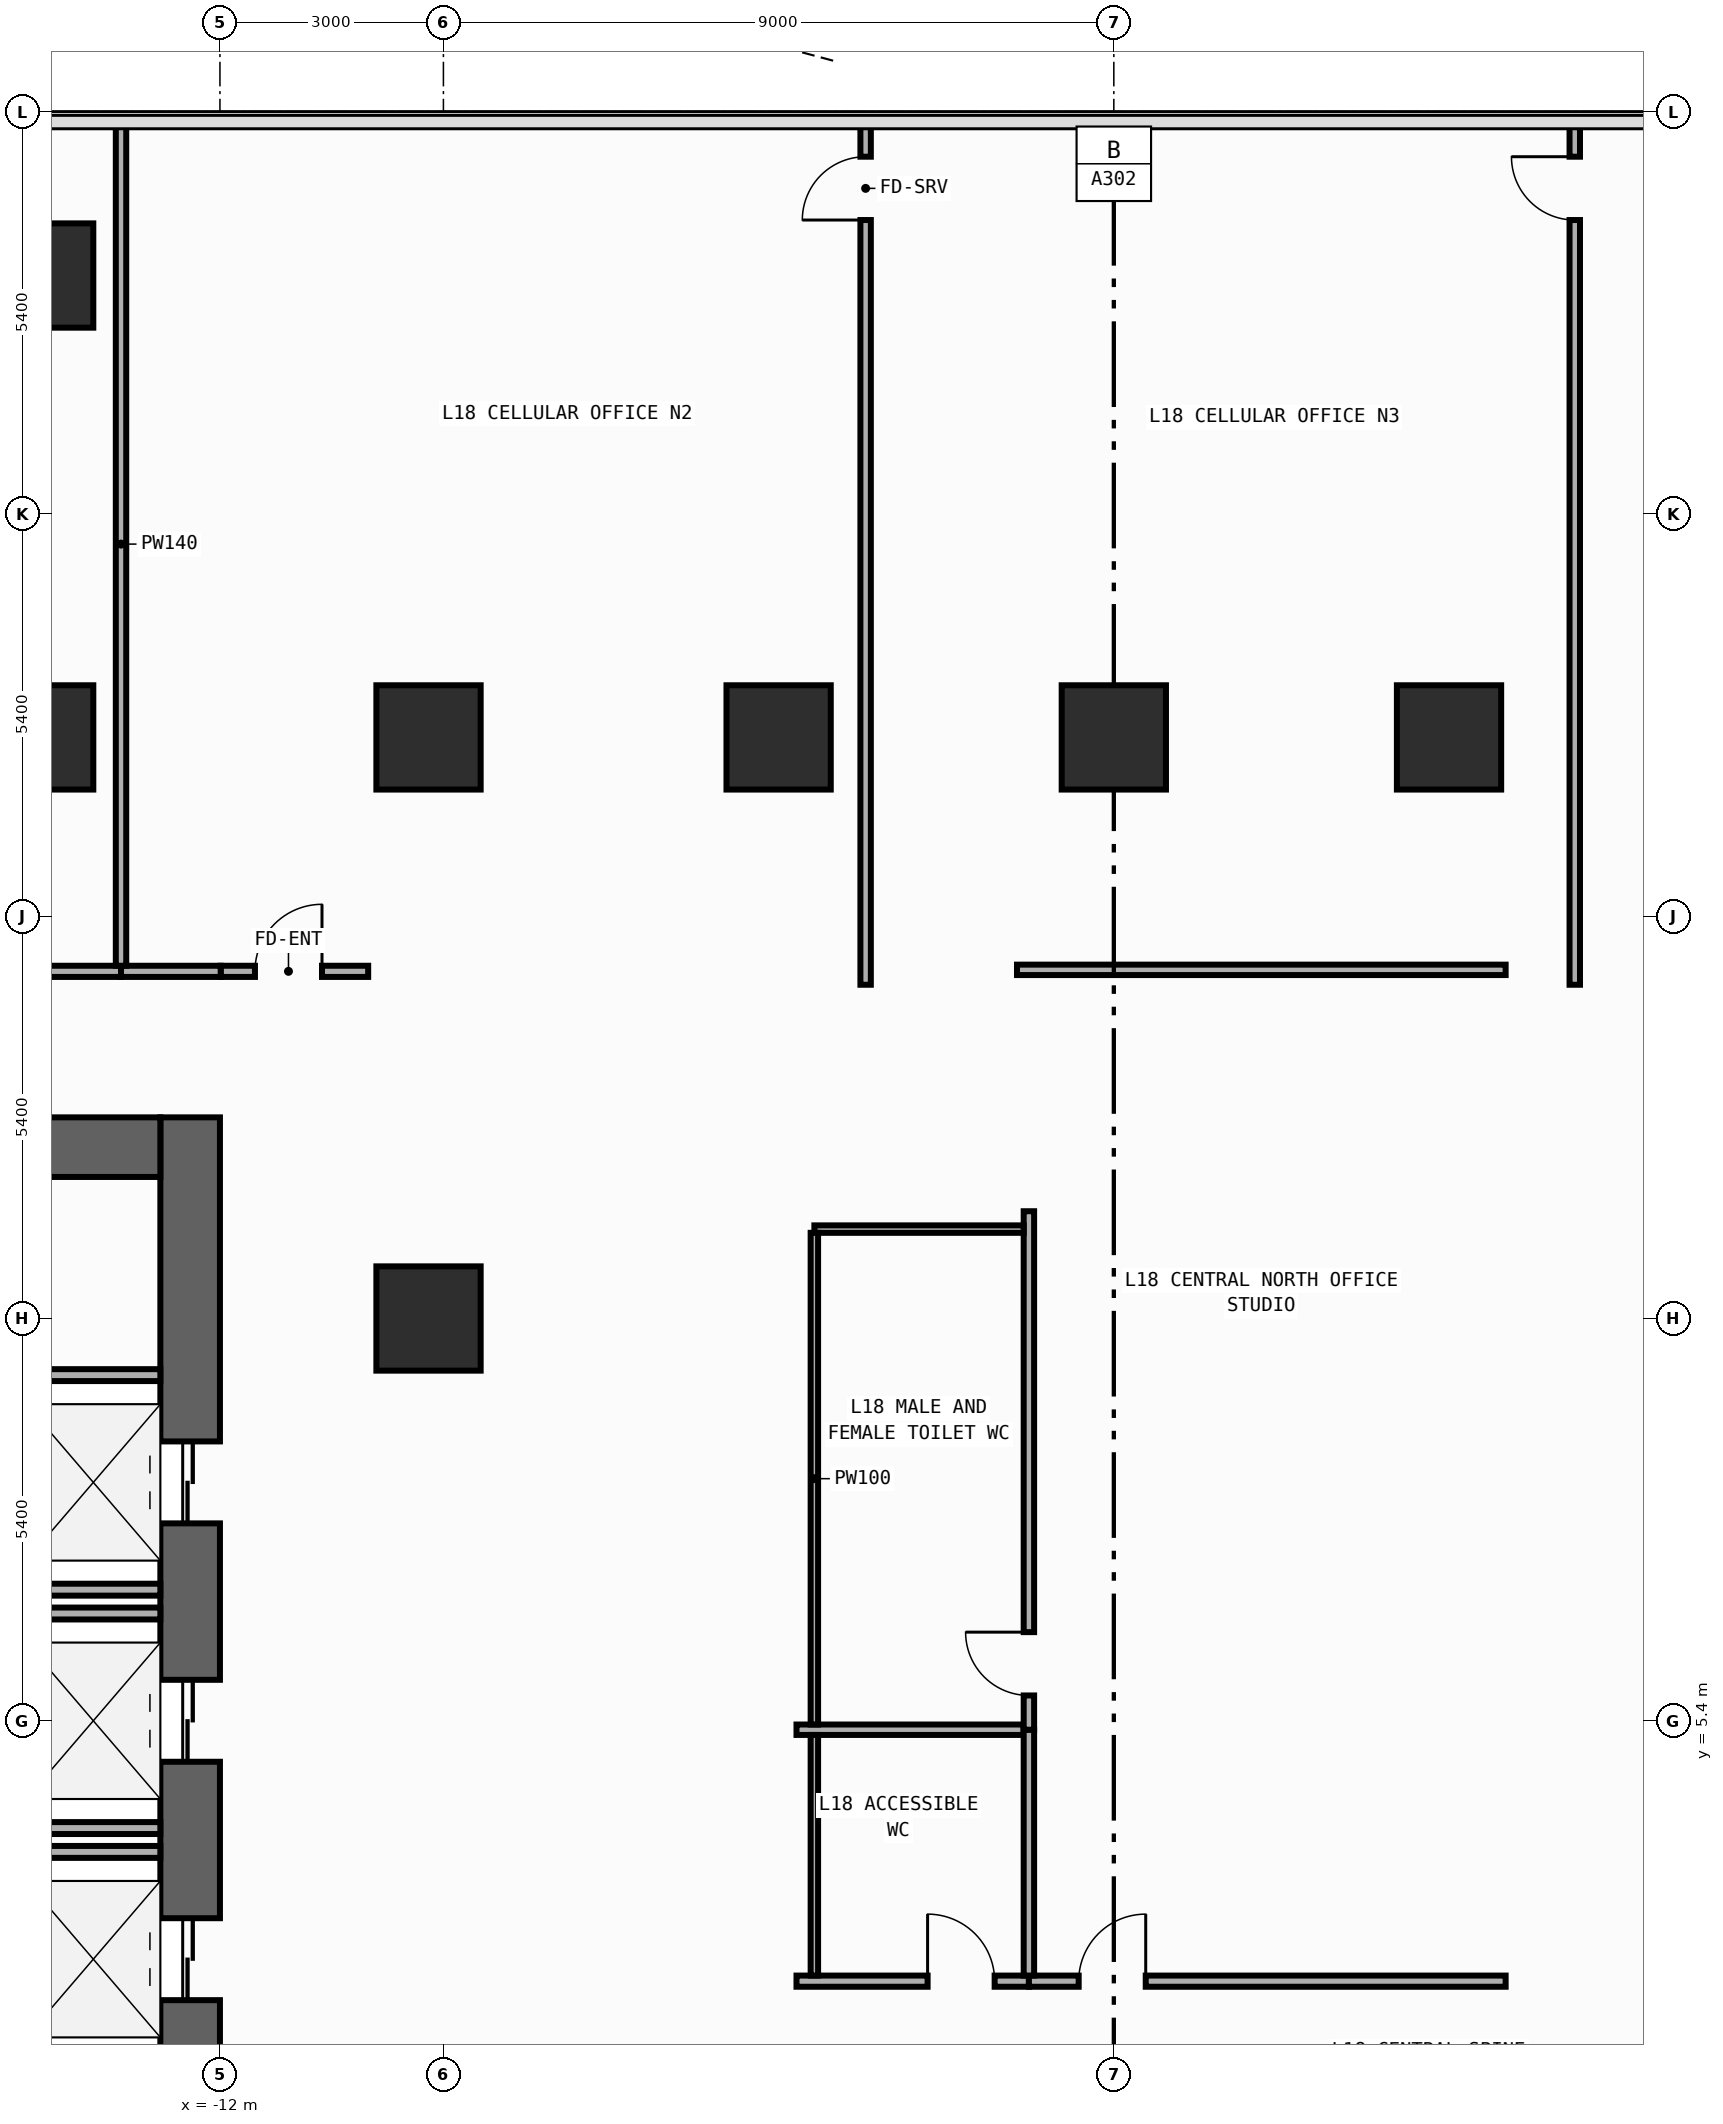
"""IFC4 building model, lengths in metres.
Left out: names, types, materials, properties, quantities, classifications, styles, units other than length and angle.
Written with IfcOpenShell. Run it as: python <this file> out.ifc"""

import sys

from ifc_helpers import new_model, si_unit, direction, frame, frame_2d, origin, origin_2d, place, context, subcontext, project, spatial, rectangle, extrude, element, fill, save


model = new_model("IFC4")
c1 = context("Model", 3, precision=1e-05, world=origin(), true_north=direction((0.0, 1.0)))
c2 = subcontext(c1, "Body", "Model", "MODEL_VIEW")
j1 = project(units=[si_unit("LENGTHUNIT", "METRE"), si_unit("PLANEANGLEUNIT", "RADIAN")], contexts=[c1])
p1 = place(None, origin())
s1 = spatial("IfcSite", under=j1, at=p1, CompositionType="ELEMENT")
p2 = place(p1, origin())
s2 = spatial("IfcBuilding", under=s1, at=p2, CompositionType="ELEMENT")
p3 = place(p2, frame((0.0, 0.0, 76.4)))
s3 = spatial("IfcBuildingStorey", under=s2, at=p3, CompositionType="ELEMENT", Elevation=76.4)
p4 = place(p3, frame((-12.4, -13.5, 0.0), z_axis=(0.0, 0.0, 1.0), x_axis=(0.0, 1.0, 0.0)))
e1 = element("IfcWall", 1, at=p4, inside=s3, PredefinedType="SHEAR", context=c2, shape_type="SweptSolid", body=[
    extrude(rectangle(XDim=27.0, YDim=0.8, at=frame_2d((13.5, 0.0))), origin(), (0.0, 0.0, 1.0), 3.94),
])
p5 = place(p4, frame((21.55, 0.0, 0.0)))
e2 = element("IfcOpeningElement", 2, at=p5, cuts=e1, PredefinedType="OPENING", context=c2, shape_type="SweptSolid", body=[
    extrude(rectangle(XDim=1.1, YDim=2.2, at=frame_2d((0.55, 1.1))), frame((0.0, 0.41, 0.0), z_axis=(0.0, -1.0, 0.0), x_axis=(1.0, 0.0, 0.0)), (0.0, 0.0, 1.0), 0.82),
])
p6 = place(p4, frame((18.35, 0.0, 0.0)))
e3 = element("IfcOpeningElement", 3, at=p6, cuts=e1, PredefinedType="OPENING", context=c2, shape_type="SweptSolid", body=[
    extrude(rectangle(XDim=1.1, YDim=2.2, at=frame_2d((0.55, 1.1))), frame((0.0, 0.41, 0.0), z_axis=(0.0, -1.0, 0.0), x_axis=(1.0, 0.0, 0.0)), (0.0, 0.0, 1.0), 0.82),
])
p7 = place(p4, frame((15.15, 0.0, 0.0)))
e4 = element("IfcOpeningElement", 4, at=p7, cuts=e1, PredefinedType="OPENING", context=c2, shape_type="SweptSolid", body=[
    extrude(rectangle(XDim=1.1, YDim=2.2, at=frame_2d((0.55, 1.1))), frame((0.0, 0.41, 0.0), z_axis=(0.0, -1.0, 0.0), x_axis=(1.0, 0.0, 0.0)), (0.0, 0.0, 1.0), 0.82),
])
p8 = place(p4, frame((10.35, 0.0, 0.0)))
e5 = element("IfcOpeningElement", 5, at=p8, cuts=e1, PredefinedType="OPENING", context=c2, shape_type="SweptSolid", body=[
    extrude(rectangle(XDim=1.1, YDim=2.2, at=frame_2d((0.55, 1.1))), frame((0.0, 0.41, 0.0), z_axis=(0.0, -1.0, 0.0), x_axis=(1.0, 0.0, 0.0)), (0.0, 0.0, 1.0), 0.82),
])
p9 = place(p4, frame((7.15, 0.0, 0.0)))
e6 = element("IfcOpeningElement", 6, at=p9, cuts=e1, PredefinedType="OPENING", context=c2, shape_type="SweptSolid", body=[
    extrude(rectangle(XDim=1.1, YDim=2.2, at=frame_2d((0.55, 1.1))), frame((0.0, 0.41, 0.0), z_axis=(0.0, -1.0, 0.0), x_axis=(1.0, 0.0, 0.0)), (0.0, 0.0, 1.0), 0.82),
])
p10 = place(p4, frame((3.95, 0.0, 0.0)))
e7 = element("IfcOpeningElement", 7, at=p10, cuts=e1, PredefinedType="OPENING", context=c2, shape_type="SweptSolid", body=[
    extrude(rectangle(XDim=1.1, YDim=2.2, at=frame_2d((0.55, 1.1))), frame((0.0, 0.41, 0.0), z_axis=(0.0, -1.0, 0.0), x_axis=(1.0, 0.0, 0.0)), (0.0, 0.0, 1.0), 0.82),
])
p11 = place(p4, frame((12.725, 0.0, 0.0)))
e8 = element("IfcOpeningElement", 8, at=p11, cuts=e1, PredefinedType="OPENING", context=c2, shape_type="SweptSolid", body=[
    extrude(rectangle(XDim=1.15, YDim=2.2, at=frame_2d((0.575, 1.1))), frame((0.0, 0.41, 0.0), z_axis=(0.0, -1.0, 0.0), x_axis=(1.0, 0.0, 0.0)), (0.0, 0.0, 1.0), 0.82),
])
p12 = place(p4, frame((1.625, 0.0, 0.0)))
e9 = element("IfcOpeningElement", 9, at=p12, cuts=e1, PredefinedType="OPENING", context=c2, shape_type="SweptSolid", body=[
    extrude(rectangle(XDim=0.85, YDim=2.1, at=frame_2d((0.425, 1.05))), frame((0.0, 0.41, 0.0), z_axis=(0.0, -1.0, 0.0), x_axis=(1.0, 0.0, 0.0)), (0.0, 0.0, 1.0), 0.82),
])
p13 = place(p3, frame((-19.6, 13.1, 0.0), z_axis=(0.0, 0.0, 1.0), x_axis=(1.0, 0.0, 0.0)))
e10 = element("IfcWall", 10, at=p13, inside=s3, PredefinedType="SHEAR", context=c2, shape_type="SweptSolid", body=[
    extrude(rectangle(XDim=6.8, YDim=0.8, at=frame_2d((3.4, 0.0))), origin(), (0.0, 0.0, 1.0), 3.94),
])
for number, where, z_axis, x_axis in (
    (11, (-9.2, 10.8, 0.0), (0.0, 0.0, 1.0), (1.0, 0.0, 0.0)),
    (12, (-9.2, 18.6, 0.0), (0.0, 0.0, 1.0), (1.0, 0.0, 0.0)),
    (13, (-14.4, 18.6, 0.0), (0.0, 0.0, 1.0), (1.0, 0.0, 0.0)),
    (14, (-4.5, 18.6, 0.0), (0.0, 0.0, 1.0), (1.0, 0.0, 0.0)),
    (15, (0.0, 18.6, 0.0), (0.0, 0.0, 1.0), (1.0, 0.0, 0.0)),
    (16, (4.5, 18.6, 0.0), (0.0, 0.0, 1.0), (1.0, 0.0, 0.0)),
    (17, (-14.4, 24.8, 0.0), (0.0, 0.0, 1.0), (1.0, 0.0, 0.0)),
):
    element("IfcColumn", number, at=place(p3, frame(where, z_axis=z_axis, x_axis=x_axis)), inside=s3, PredefinedType="COLUMN", context=c2, shape_type="SweptSolid", body=[
        extrude(rectangle(XDim=1.4, YDim=1.4, at=origin_2d()), origin(), (0.0, 0.0, 1.0), 4.2),
    ])
for number, where, z_axis, x_axis in (
    (18, (-14.99, 7.16, 0.0), (0.0, 0.0, 1.0), (1.0, 0.0, 0.0)),
    (19, (-14.99, 10.04, 0.0), (0.0, 0.0, 1.0), (1.0, 0.0, 0.0)),
    (20, (-14.99, 3.96, 0.0), (0.0, 0.0, 1.0), (1.0, 0.0, 0.0)),
    (21, (-14.99, 6.84, 0.0), (0.0, 0.0, 1.0), (1.0, 0.0, 0.0)),
    (22, (-14.99, 3.64, 0.0), (0.0, 0.0, 1.0), (1.0, 0.0, 0.0)),
):
    element("IfcWall", number, at=place(p3, frame(where, z_axis=z_axis, x_axis=x_axis)), inside=s3, PredefinedType="STANDARD", context=c2, shape_type="SweptSolid", body=[
        extrude(rectangle(XDim=2.19, YDim=0.16, at=frame_2d((1.095, 0.0))), origin(), (0.0, 0.0, 1.0), 3.94),
    ])
p14 = place(p3, frame((-11.99, 15.46, 0.0), z_axis=(0.0, 0.0, 1.0), x_axis=(1.0, 0.0, 0.0)))
e23 = element("IfcWall", 23, at=p14, inside=s3, PredefinedType="PARTITIONING", context=c2, shape_type="SweptSolid", body=[
    extrude(rectangle(XDim=1.98, YDim=0.15, at=frame_2d((0.99, 0.0))), origin(), (0.0, 0.0, 1.0), 3.94),
])
p15 = place(p14, frame((0.46, 0.0, 0.0)))
e24 = element("IfcOpeningElement", 24, at=p15, cuts=e23, PredefinedType="OPENING", context=c2, shape_type="SweptSolid", body=[
    extrude(rectangle(XDim=0.9, YDim=2.15, at=frame_2d((0.45, 1.075))), frame((0.0, 0.085, 0.0), z_axis=(0.0, -1.0, 0.0), x_axis=(1.0, 0.0, 0.0)), (0.0, 0.0, 1.0), 0.17),
])
p16 = place(p3, frame((-4.26, 1.905, 0.0), z_axis=(0.0, 0.0, 1.0), x_axis=(1.0, 0.0, 0.0)))
e25 = element("IfcWall", 25, at=p16, inside=s3, PredefinedType="PARTITIONING", context=c2, shape_type="SweptSolid", body=[
    extrude(rectangle(XDim=3.12, YDim=0.15, at=frame_2d((1.56, 0.0))), origin(), (0.0, 0.0, 1.0), 3.94),
])
p17 = place(p16, frame((1.76, 0.0, 0.0)))
e26 = element("IfcOpeningElement", 26, at=p17, cuts=e25, PredefinedType="OPENING", context=c2, shape_type="SweptSolid", body=[
    extrude(rectangle(XDim=0.9, YDim=2.15, at=frame_2d((0.45, 1.075))), frame((0.0, 0.085, 0.0), z_axis=(0.0, -1.0, 0.0), x_axis=(1.0, 0.0, 0.0)), (0.0, 0.0, 1.0), 0.17),
])
p18 = place(p3, frame((-1.14, 1.905, 0.0), z_axis=(0.0, 0.0, 1.0), x_axis=(1.0, 0.0, 0.0)))
e27 = element("IfcWall", 27, at=p18, inside=s3, PredefinedType="PARTITIONING", context=c2, shape_type="SweptSolid", body=[
    extrude(rectangle(XDim=6.4, YDim=0.15, at=frame_2d((3.2, 0.0))), origin(), (0.0, 0.0, 1.0), 3.94),
])
p19 = place(p18, frame((0.668, 0.0, 0.0)))
e28 = element("IfcOpeningElement", 28, at=p19, cuts=e27, PredefinedType="OPENING", context=c2, shape_type="SweptSolid", body=[
    extrude(rectangle(XDim=0.9, YDim=2.15, at=frame_2d((0.45, 1.075))), frame((0.0, 0.085, 0.0), z_axis=(0.0, -1.0, 0.0), x_axis=(1.0, 0.0, 0.0)), (0.0, 0.0, 1.0), 0.17),
])
p20 = place(p3, frame((-20.64, 15.46, 0.0), z_axis=(0.0, 0.0, 1.0), x_axis=(1.0, 0.0, 0.0)))
e29 = element("IfcWall", 29, at=p20, inside=s3, PredefinedType="PARTITIONING", context=c2, shape_type="SweptSolid", body=[
    extrude(rectangle(XDim=7.312, YDim=0.15, at=frame_2d((3.656, 0.0))), origin(), (0.0, 0.0, 1.0), 3.94),
])
p21 = place(p20, frame((2.698, 0.0, 0.0)))
e30 = element("IfcOpeningElement", 30, at=p21, cuts=e29, PredefinedType="OPENING", context=c2, shape_type="SweptSolid", body=[
    extrude(rectangle(XDim=0.9, YDim=2.15, at=frame_2d((0.45, 1.075))), frame((0.0, 0.085, 0.0), z_axis=(0.0, -1.0, 0.0), x_axis=(1.0, 0.0, 0.0)), (0.0, 0.0, 1.0), 0.17),
])
p22 = place(p3, frame((-13.328, 15.46, 0.0), z_axis=(0.0, 0.0, 1.0), x_axis=(1.0, 0.0, 0.0)))
e31 = element("IfcWall", 31, at=p22, inside=s3, PredefinedType="PARTITIONING", context=c2, shape_type="SweptSolid", body=[
    extrude(rectangle(XDim=1.338, YDim=0.15, at=frame_2d((0.669, 0.0))), origin(), (0.0, 0.0, 1.0), 3.94),
])
p23 = place(p3, frame((-13.328, 15.535, 0.0), z_axis=(0.0, 0.0, 1.0), x_axis=(0.0, 1.0, 0.0)))
e32 = element("IfcWall", 32, at=p23, inside=s3, PredefinedType="PARTITIONING", context=c2, shape_type="SweptSolid", body=[
    extrude(rectangle(XDim=11.32, YDim=0.14, at=frame_2d((5.66, 0.0))), origin(), (0.0, 0.0, 1.0), 3.94),
])
p24 = place(p3, frame((-3.332, 15.28, 0.0), z_axis=(0.0, 0.0, 1.0), x_axis=(0.0, 1.0, 0.0)))
e33 = element("IfcWall", 33, at=p24, inside=s3, PredefinedType="PARTITIONING", context=c2, shape_type="SweptSolid", body=[
    extrude(rectangle(XDim=11.575, YDim=0.14, at=frame_2d((5.788, 0.0))), origin(), (0.0, 0.0, 1.0), 3.94),
])
p25 = place(p24, frame((10.265, 0.0, 0.0)))
e34 = element("IfcOpeningElement", 34, at=p25, cuts=e33, PredefinedType="OPENING", context=c2, shape_type="SweptSolid", body=[
    extrude(rectangle(XDim=0.85, YDim=2.1, at=frame_2d((0.425, 1.05))), frame((0.0, 0.08, 0.0), z_axis=(0.0, -1.0, 0.0), x_axis=(1.0, 0.0, 0.0)), (0.0, 0.0, 1.0), 0.16),
])
p26 = place(p3, frame((6.188, 15.28, 0.0), z_axis=(0.0, 0.0, 1.0), x_axis=(0.0, 1.0, 0.0)))
e35 = element("IfcWall", 35, at=p26, inside=s3, PredefinedType="PARTITIONING", context=c2, shape_type="SweptSolid", body=[
    extrude(rectangle(XDim=11.575, YDim=0.14, at=frame_2d((5.788, 0.0))), origin(), (0.0, 0.0, 1.0), 3.94),
])
p27 = place(p26, frame((10.265, 0.0, 0.0)))
e36 = element("IfcOpeningElement", 36, at=p27, cuts=e35, PredefinedType="OPENING", context=c2, shape_type="SweptSolid", body=[
    extrude(rectangle(XDim=0.85, YDim=2.1, at=frame_2d((0.425, 1.05))), frame((0.0, 0.08, 0.0), z_axis=(0.0, -1.0, 0.0), x_axis=(1.0, 0.0, 0.0)), (0.0, 0.0, 1.0), 0.16),
])
p28 = place(p3, frame((-1.3, 15.48, 0.0), z_axis=(0.0, 0.0, 1.0), x_axis=(1.0, 0.0, 0.0)))
e37 = element("IfcWall", 37, at=p28, inside=s3, PredefinedType="PARTITIONING", context=c2, shape_type="SweptSolid", body=[
    extrude(rectangle(XDim=6.56, YDim=0.14, at=frame_2d((3.28, 0.0))), origin(), (0.0, 0.0, 1.0), 3.94),
])
p29 = place(p3, frame((-4.26, 5.28, 0.0), z_axis=(0.0, 0.0, 1.0), x_axis=(1.0, 0.0, 0.0)))
e38 = element("IfcWall", 38, at=p29, inside=s3, PredefinedType="PARTITIONING", context=c2, shape_type="SweptSolid", body=[
    extrude(rectangle(XDim=3.05, YDim=0.14, at=frame_2d((1.525, 0.0))), origin(), (0.0, 0.0, 1.0), 3.94),
])
p30 = place(p3, frame((-1.14, 1.98, 0.0), z_axis=(0.0, 0.0, 1.0), x_axis=(0.0, 1.0, 0.0)))
e39 = element("IfcWall", 39, at=p30, inside=s3, PredefinedType="PARTITIONING", context=c2, shape_type="SweptSolid", body=[
    extrude(rectangle(XDim=3.3, YDim=0.14, at=frame_2d((1.65, 0.0))), origin(), (0.0, 0.0, 1.0), 3.94),
])
p31 = place(p3, frame((-1.14, 5.28, 0.0), z_axis=(0.0, 0.0, 1.0), x_axis=(0.0, 1.0, 0.0)))
e40 = element("IfcWall", 40, at=p31, inside=s3, PredefinedType="PARTITIONING", context=c2, shape_type="SweptSolid", body=[
    extrude(rectangle(XDim=6.96, YDim=0.14, at=frame_2d((3.48, 0.0))), origin(), (0.0, 0.0, 1.0), 3.94),
])
p32 = place(p31, frame((0.46, 0.0, 0.0)))
e41 = element("IfcOpeningElement", 41, at=p32, cuts=e40, PredefinedType="OPENING", context=c2, shape_type="SweptSolid", body=[
    extrude(rectangle(XDim=0.85, YDim=2.1, at=frame_2d((0.425, 1.05))), frame((0.0, 0.08, 0.0), z_axis=(0.0, -1.0, 0.0), x_axis=(1.0, 0.0, 0.0)), (0.0, 0.0, 1.0), 0.16),
])
p33 = place(p3, frame((-4.02, 1.98, 0.0), z_axis=(0.0, 0.0, 1.0), x_axis=(0.0, 1.0, 0.0)))
e42 = element("IfcWall", 42, at=p33, inside=s3, PredefinedType="PARTITIONING", context=c2, shape_type="SweptSolid", body=[
    extrude(rectangle(XDim=3.23, YDim=0.1, at=frame_2d((1.615, 0.0))), origin(), (0.0, 0.0, 1.0), 3.94),
])
p34 = place(p3, frame((-4.02, 12.0, 0.0), z_axis=(0.0, 0.0, 1.0), x_axis=(1.0, 0.0, 0.0)))
e43 = element("IfcWall", 43, at=p34, inside=s3, PredefinedType="PARTITIONING", context=c2, shape_type="SweptSolid", body=[
    extrude(rectangle(XDim=2.81, YDim=0.1, at=frame_2d((1.405, 0.0))), origin(), (0.0, 0.0, 1.0), 3.94),
])
p35 = place(p3, frame((-4.02, 5.35, 0.0), z_axis=(0.0, 0.0, 1.0), x_axis=(0.0, 1.0, 0.0)))
e44 = element("IfcWall", 44, at=p35, inside=s3, PredefinedType="PARTITIONING", context=c2, shape_type="SweptSolid", body=[
    extrude(rectangle(XDim=6.6, YDim=0.1, at=frame_2d((3.3, 0.0))), origin(), (0.0, 0.0, 1.0), 3.94),
])
p36 = place(p5, origin())
e45 = element("IfcDoor", 45, at=p36, inside=s3, OperationType="DOUBLE_DOOR_SLIDING", PredefinedType="DOOR", context=c2, shape_type="SweptSolid", body=[
    extrude(rectangle(XDim=1.1, YDim=2.2, at=frame_2d((0.55, 1.1))), frame((0.0, 0.025, 0.0), z_axis=(0.0, -1.0, 0.0), x_axis=(1.0, 0.0, 0.0)), (0.0, 0.0, 1.0), 0.05),
])
fill(e2, e45)
p37 = place(p6, origin())
e46 = element("IfcDoor", 46, at=p37, inside=s3, OperationType="DOUBLE_DOOR_SLIDING", PredefinedType="DOOR", context=c2, shape_type="SweptSolid", body=[
    extrude(rectangle(XDim=1.1, YDim=2.2, at=frame_2d((0.55, 1.1))), frame((0.0, 0.025, 0.0), z_axis=(0.0, -1.0, 0.0), x_axis=(1.0, 0.0, 0.0)), (0.0, 0.0, 1.0), 0.05),
])
fill(e3, e46)
p38 = place(p7, origin())
e47 = element("IfcDoor", 47, at=p38, inside=s3, OperationType="DOUBLE_DOOR_SLIDING", PredefinedType="DOOR", context=c2, shape_type="SweptSolid", body=[
    extrude(rectangle(XDim=1.1, YDim=2.2, at=frame_2d((0.55, 1.1))), frame((0.0, 0.025, 0.0), z_axis=(0.0, -1.0, 0.0), x_axis=(1.0, 0.0, 0.0)), (0.0, 0.0, 1.0), 0.05),
])
fill(e4, e47)
p39 = place(p15, origin())
e48 = element("IfcDoor", 48, at=p39, inside=s3, OperationType="SINGLE_SWING_RIGHT", PredefinedType="DOOR", context=c2, shape_type="SweptSolid", body=[
    extrude(rectangle(XDim=0.9, YDim=2.15, at=frame_2d((0.45, 1.075))), frame((0.0, 0.025, 0.0), z_axis=(0.0, -1.0, 0.0), x_axis=(1.0, 0.0, 0.0)), (0.0, 0.0, 1.0), 0.05),
])
fill(e24, e48)
p40 = place(p17, origin())
e49 = element("IfcDoor", 49, at=p40, inside=s3, OperationType="SINGLE_SWING_LEFT", PredefinedType="DOOR", context=c2, shape_type="SweptSolid", body=[
    extrude(rectangle(XDim=0.9, YDim=2.15, at=frame_2d((0.45, 1.075))), frame((0.0, 0.025, 0.0), z_axis=(0.0, -1.0, 0.0), x_axis=(1.0, 0.0, 0.0)), (0.0, 0.0, 1.0), 0.05),
])
fill(e26, e49)
p41 = place(p19, origin())
e50 = element("IfcDoor", 50, at=p41, inside=s3, OperationType="SINGLE_SWING_RIGHT", PredefinedType="DOOR", context=c2, shape_type="SweptSolid", body=[
    extrude(rectangle(XDim=0.9, YDim=2.15, at=frame_2d((0.45, 1.075))), frame((0.0, 0.025, 0.0), z_axis=(0.0, -1.0, 0.0), x_axis=(1.0, 0.0, 0.0)), (0.0, 0.0, 1.0), 0.05),
])
fill(e28, e50)
p42 = place(p25, origin())
e51 = element("IfcDoor", 51, at=p42, inside=s3, OperationType="SINGLE_SWING_LEFT", PredefinedType="DOOR", context=c2, shape_type="SweptSolid", body=[
    extrude(rectangle(XDim=0.85, YDim=2.1, at=frame_2d((0.425, 1.05))), frame((0.0, 0.025, 0.0), z_axis=(0.0, -1.0, 0.0), x_axis=(1.0, 0.0, 0.0)), (0.0, 0.0, 1.0), 0.05),
])
fill(e34, e51)
p43 = place(p27, origin())
e52 = element("IfcDoor", 52, at=p43, inside=s3, OperationType="SINGLE_SWING_RIGHT", PredefinedType="DOOR", context=c2, shape_type="SweptSolid", body=[
    extrude(rectangle(XDim=0.85, YDim=2.1, at=frame_2d((0.425, 1.05))), frame((0.0, 0.025, 0.0), z_axis=(0.0, -1.0, 0.0), x_axis=(1.0, 0.0, 0.0)), (0.0, 0.0, 1.0), 0.05),
])
fill(e36, e52)
p44 = place(p32, origin())
e53 = element("IfcDoor", 53, at=p44, inside=s3, OperationType="SINGLE_SWING_RIGHT", PredefinedType="DOOR", context=c2, shape_type="SweptSolid", body=[
    extrude(rectangle(XDim=0.85, YDim=2.1, at=frame_2d((0.425, 1.05))), frame((0.0, 0.025, 0.0), z_axis=(0.0, -1.0, 0.0), x_axis=(1.0, 0.0, 0.0)), (0.0, 0.0, 1.0), 0.05),
])
fill(e41, e53)
save(model, sys.argv[1])
